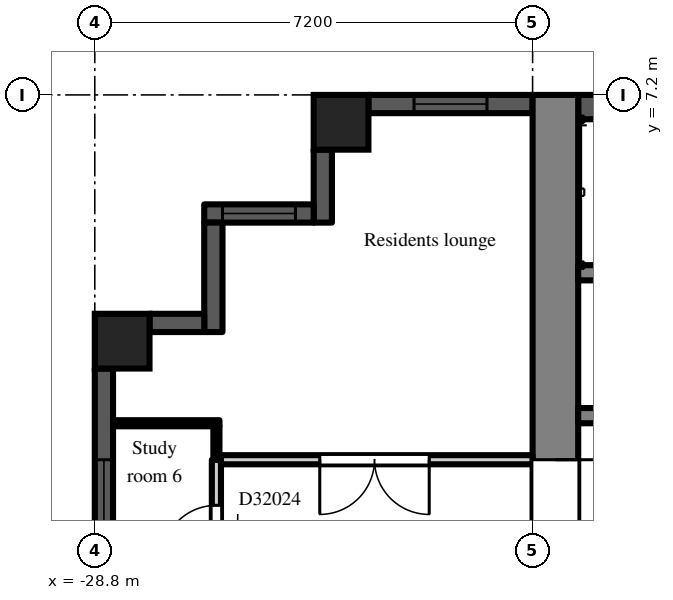
"""IFC4 building model, lengths in metres.
Left out: names, types, materials, properties, quantities, classifications, styles, units other than length and angle.
Written with IfcOpenShell. Run it as: python <this file> out.ifc"""

import sys

from ifc_helpers import new_model, si_unit, direction, frame, frame_2d, origin, origin_2d, place, context, subcontext, project, spatial, rectangle, extrude, element, fill, save


model = new_model("IFC4")
c1 = context("Model", 3, precision=1e-05, world=origin(), true_north=direction((0.0, 1.0)))
c2 = subcontext(c1, "Body", "Model", "MODEL_VIEW")
j1 = project(units=[si_unit("LENGTHUNIT", "METRE"), si_unit("PLANEANGLEUNIT", "RADIAN")], contexts=[c1])
p1 = place(None, origin())
s1 = spatial("IfcSite", under=j1, at=p1, CompositionType="ELEMENT")
p2 = place(p1, origin())
s2 = spatial("IfcBuilding", under=s1, at=p2, CompositionType="ELEMENT")
p3 = place(p2, frame((0.0, 0.0, 225.9)))
s3 = spatial("IfcBuildingStorey", under=s2, at=p3, CompositionType="ELEMENT", Elevation=225.9)
for number, where, z_axis, x_axis in (
    (1, (-28.35, 3.15, 0.0), (0.0, 0.0, 1.0), (1.0, 0.0, 0.0)),
    (2, (-24.75, 6.75, 0.0), (0.0, 0.0, 1.0), (1.0, 0.0, 0.0)),
):
    element("IfcColumn", number, at=place(p3, frame(where, z_axis=z_axis, x_axis=x_axis)), inside=s3, PredefinedType="COLUMN", context=c2, shape_type="SweptSolid", body=[
        extrude(rectangle(XDim=0.9, YDim=0.9, at=origin_2d()), origin(), (0.0, 0.0, 1.0), 3.0),
    ])
p4 = place(p3, frame((-21.6, 7.05, 0.0), z_axis=(0.0, 0.0, 1.0), x_axis=(-1.0, 0.0, 0.0)))
e3 = element("IfcWall", 3, at=p4, inside=s3, PredefinedType="SOLIDWALL", context=c2, shape_type="SweptSolid", body=[
    extrude(rectangle(XDim=2.7, YDim=0.3, at=frame_2d((1.35, 0.0))), origin(), (0.0, 0.0, 1.0), 2.3),
])
p5 = place(p4, frame((0.75, 0.0, 0.2)))
e4 = element("IfcOpeningElement", 4, at=p5, cuts=e3, PredefinedType="OPENING", context=c2, shape_type="SweptSolid", body=[
    extrude(rectangle(XDim=1.2, YDim=1.85, at=frame_2d((0.6, 0.925))), frame((0.0, 0.16, 0.0), z_axis=(0.0, -1.0, 0.0), x_axis=(1.0, 0.0, 0.0)), (0.0, 0.0, 1.0), 0.32),
])
p6 = place(p3, frame((-25.05, 6.3, 0.0), z_axis=(0.0, 0.0, 1.0), x_axis=(0.0, -1.0, 0.0)))
e5 = element("IfcWall", 5, at=p6, inside=s3, PredefinedType="SOLIDWALL", context=c2, shape_type="SweptSolid", body=[
    extrude(rectangle(XDim=1.2, YDim=0.3, at=frame_2d((0.6, 0.0))), origin(), (0.0, 0.0, 1.0), 2.6),
])
p7 = place(p3, frame((-25.2, 5.25, 0.0), z_axis=(0.0, 0.0, 1.0), x_axis=(-1.0, 0.0, 0.0)))
e6 = element("IfcWall", 6, at=p7, inside=s3, PredefinedType="SOLIDWALL", context=c2, shape_type="SweptSolid", body=[
    extrude(rectangle(XDim=1.8, YDim=0.3, at=frame_2d((0.9, 0.0))), origin(), (0.0, 0.0, 1.0), 2.6),
])
p8 = place(p7, frame((0.3, 0.0, 0.2)))
e7 = element("IfcOpeningElement", 7, at=p8, cuts=e6, PredefinedType="OPENING", context=c2, shape_type="SweptSolid", body=[
    extrude(rectangle(XDim=1.2, YDim=1.85, at=frame_2d((0.6, 0.925))), frame((0.0, 0.16, 0.0), z_axis=(0.0, -1.0, 0.0), x_axis=(1.0, 0.0, 0.0)), (0.0, 0.0, 1.0), 0.32),
])
p9 = place(p3, frame((-26.85, 5.1, 0.0), z_axis=(0.0, 0.0, 1.0), x_axis=(0.0, -1.0, 0.0)))
e8 = element("IfcWall", 8, at=p9, inside=s3, PredefinedType="SOLIDWALL", context=c2, shape_type="SweptSolid", body=[
    extrude(rectangle(XDim=1.8, YDim=0.3, at=frame_2d((0.9, 0.0))), origin(), (0.0, 0.0, 1.0), 2.6),
])
p10 = place(p3, frame((-27.0, 3.45, 0.0), z_axis=(0.0, 0.0, 1.0), x_axis=(-1.0, 0.0, 0.0)))
e9 = element("IfcWall", 9, at=p10, inside=s3, PredefinedType="SOLIDWALL", context=c2, shape_type="SweptSolid", body=[
    extrude(rectangle(XDim=0.9, YDim=0.3, at=frame_2d((0.45, 0.0))), origin(), (0.0, 0.0, 1.0), 2.6),
])
p11 = place(p3, frame((-28.65, 2.7, 0.0), z_axis=(0.0, 0.0, 1.0), x_axis=(0.0, -1.0, 0.0)))
e10 = element("IfcWall", 10, at=p11, inside=s3, PredefinedType="SOLIDWALL", context=c2, shape_type="SweptSolid", body=[
    extrude(rectangle(XDim=5.4, YDim=0.3, at=frame_2d((2.7, 0.0))), origin(), (0.0, 0.0, 1.0), 2.3),
])
p12 = place(p11, frame((1.5, 0.0, 0.2)))
e11 = element("IfcOpeningElement", 11, at=p12, cuts=e10, PredefinedType="OPENING", context=c2, shape_type="SweptSolid", body=[
    extrude(rectangle(XDim=2.4, YDim=1.85, at=frame_2d((1.2, 0.925))), frame((0.0, 0.16, 0.0), z_axis=(0.0, -1.0, 0.0), x_axis=(1.0, 0.0, 0.0)), (0.0, 0.0, 1.0), 0.32),
])
p13 = place(p3, frame((-21.225, -7.2, 0.0), z_axis=(0.0, 0.0, 1.0), x_axis=(0.0, 1.0, 0.0)))
e12 = element("IfcWall", 12, at=p13, inside=s3, PredefinedType="SHEAR", context=c2, shape_type="SweptSolid", body=[
    extrude(rectangle(XDim=14.4, YDim=0.75, at=frame_2d((7.2, 0.0))), origin(), (0.0, 0.0, 1.0), 2.6),
])
p14 = place(p13, frame((6.0, 0.0, 0.0)))
e13 = element("IfcOpeningElement", 13, at=p14, cuts=e12, PredefinedType="OPENING", context=c2, shape_type="SweptSolid", body=[
    extrude(rectangle(XDim=2.4, YDim=2.2, at=frame_2d((1.2, 1.1))), frame((0.0, 0.385, 0.0), z_axis=(0.0, -1.0, 0.0), x_axis=(1.0, 0.0, 0.0)), (0.0, 0.0, 1.0), 0.77),
])
p15 = place(p3, frame((-7.9, 7.0, 0.0), z_axis=(0.0, 0.0, 1.0), x_axis=(-1.0, 0.0, 0.0)))
e14 = element("IfcWall", 14, at=p15, inside=s3, PredefinedType="SHEAR", context=c2, shape_type="SweptSolid", body=[
    extrude(rectangle(XDim=12.95, YDim=0.4, at=frame_2d((6.475, 0.0))), origin(), (0.0, 0.0, 1.0), 2.6),
])
p16 = place(p3, frame((-7.9, 1.925, 0.0), z_axis=(0.0, 0.0, 1.0), x_axis=(-1.0, 0.0, 0.0)))
e15 = element("IfcWall", 15, at=p16, inside=s3, PredefinedType="SHEAR", context=c2, shape_type="SweptSolid", body=[
    extrude(rectangle(XDim=12.95, YDim=0.25, at=frame_2d((6.475, 0.0))), origin(), (0.0, 0.0, 1.0), 2.6),
])
p17 = place(p16, frame((4.825, 0.0, 0.0)))
e16 = element("IfcOpeningElement", 16, at=p17, cuts=e15, PredefinedType="OPENING", context=c2, shape_type="SweptSolid", body=[
    extrude(rectangle(XDim=1.1, YDim=2.1, at=frame_2d((0.55, 1.05))), frame((0.0, 0.135, 0.0), z_axis=(0.0, -1.0, 0.0), x_axis=(1.0, 0.0, 0.0)), (0.0, 0.0, 1.0), 0.27),
])
p18 = place(p16, frame((7.025, 0.0, 0.0)))
e17 = element("IfcOpeningElement", 17, at=p18, cuts=e15, PredefinedType="OPENING", context=c2, shape_type="SweptSolid", body=[
    extrude(rectangle(XDim=1.1, YDim=2.1, at=frame_2d((0.55, 1.05))), frame((0.0, 0.135, 0.0), z_axis=(0.0, -1.0, 0.0), x_axis=(1.0, 0.0, 0.0)), (0.0, 0.0, 1.0), 0.27),
])
p19 = place(p16, frame((9.225, 0.0, 0.0)))
e18 = element("IfcOpeningElement", 18, at=p19, cuts=e15, PredefinedType="OPENING", context=c2, shape_type="SweptSolid", body=[
    extrude(rectangle(XDim=1.1, YDim=2.1, at=frame_2d((0.55, 1.05))), frame((0.0, 0.135, 0.0), z_axis=(0.0, -1.0, 0.0), x_axis=(1.0, 0.0, 0.0)), (0.0, 0.0, 1.0), 0.27),
])
p20 = place(p16, frame((0.525, 0.0, 0.0)))
e19 = element("IfcOpeningElement", 19, at=p20, cuts=e15, PredefinedType="OPENING", context=c2, shape_type="SweptSolid", body=[
    extrude(rectangle(XDim=0.9, YDim=2.1, at=frame_2d((0.45, 1.05))), frame((0.0, 0.135, 0.0), z_axis=(0.0, -1.0, 0.0), x_axis=(1.0, 0.0, 0.0)), (0.0, 0.0, 1.0), 0.27),
])
p21 = place(p16, frame((2.625, 0.0, 0.0)))
e20 = element("IfcOpeningElement", 20, at=p21, cuts=e15, PredefinedType="OPENING", context=c2, shape_type="SweptSolid", body=[
    extrude(rectangle(XDim=1.1, YDim=2.1, at=frame_2d((0.55, 1.05))), frame((0.0, 0.135, 0.0), z_axis=(0.0, -1.0, 0.0), x_axis=(1.0, 0.0, 0.0)), (0.0, 0.0, 1.0), 0.27),
])
p22 = place(p16, frame((11.525, 0.0, 0.0)))
e21 = element("IfcOpeningElement", 21, at=p22, cuts=e15, PredefinedType="OPENING", context=c2, shape_type="SweptSolid", body=[
    extrude(rectangle(XDim=0.9, YDim=2.1, at=frame_2d((0.45, 1.05))), frame((0.0, 0.135, 0.0), z_axis=(0.0, -1.0, 0.0), x_axis=(1.0, 0.0, 0.0)), (0.0, 0.0, 1.0), 0.27),
])
p23 = place(p3, frame((-12.3, 4.275, 0.0), z_axis=(0.0, 0.0, 1.0), x_axis=(-1.0, 0.0, 0.0)))
e22 = element("IfcWall", 22, at=p23, inside=s3, PredefinedType="SHEAR", context=c2, shape_type="SweptSolid", body=[
    extrude(rectangle(XDim=8.55, YDim=0.25, at=frame_2d((4.275, 0.0))), origin(), (0.0, 0.0, 1.0), 2.6),
])
p24 = place(p3, frame((-28.5, 1.8, 0.0), z_axis=(0.0, 0.0, 1.0), x_axis=(1.0, 0.0, 0.0)))
e23 = element("IfcWall", 23, at=p24, inside=s3, PredefinedType="PARTITIONING", context=c2, shape_type="SweptSolid", body=[
    extrude(rectangle(XDim=1.75, YDim=0.1, at=frame_2d((0.875, 0.0))), origin(), (0.0, 0.0, 1.0), 2.6),
])
p25 = place(p3, frame((-26.8, -1.2, 0.0), z_axis=(0.0, 0.0, 1.0), x_axis=(0.0, 1.0, 0.0)))
e24 = element("IfcWall", 24, at=p25, inside=s3, PredefinedType="PARTITIONING", context=c2, shape_type="SweptSolid", body=[
    extrude(rectangle(XDim=2.4, YDim=0.15, at=frame_2d((1.2, 0.0))), origin(), (0.0, 0.0, 1.0), 2.6),
])
p26 = place(p25, frame((0.75, 0.0, 0.0)))
e25 = element("IfcOpeningElement", 25, at=p26, cuts=e24, PredefinedType="OPENING", context=c2, shape_type="SweptSolid", body=[
    extrude(rectangle(XDim=0.9, YDim=2.1, at=frame_2d((0.45, 1.05))), frame((0.0, 0.085, 0.0), z_axis=(0.0, -1.0, 0.0), x_axis=(1.0, 0.0, 0.0)), (0.0, 0.0, 1.0), 0.17),
])
p27 = place(p3, frame((-26.8, 1.2, 0.0), z_axis=(0.0, 0.0, 1.0), x_axis=(0.0, 1.0, 0.0)))
e26 = element("IfcWall", 26, at=p27, inside=s3, PredefinedType="PARTITIONING", context=c2, shape_type="SweptSolid", body=[
    extrude(rectangle(XDim=0.55, YDim=0.1, at=frame_2d((0.275, 0.0))), origin(), (0.0, 0.0, 1.0), 2.6),
])
p28 = place(p3, frame((-26.725, 1.2, 0.0), z_axis=(0.0, 0.0, 1.0), x_axis=(1.0, 0.0, 0.0)))
e27 = element("IfcWall", 27, at=p28, inside=s3, PredefinedType="PARTITIONING", context=c2, shape_type="SweptSolid", body=[
    extrude(rectangle(XDim=5.125, YDim=0.15, at=frame_2d((2.562, 0.0))), origin(), (0.0, 0.0, 1.0), 2.6),
])
p29 = place(p28, frame((1.625, 0.0, 0.0)))
e28 = element("IfcOpeningElement", 28, at=p29, cuts=e27, PredefinedType="OPENING", context=c2, shape_type="SweptSolid", body=[
    extrude(rectangle(XDim=1.8, YDim=2.1, at=frame_2d((0.9, 1.05))), frame((0.0, 0.085, 0.0), z_axis=(0.0, -1.0, 0.0), x_axis=(1.0, 0.0, 0.0)), (0.0, 0.0, 1.0), 0.17),
])
p30 = place(p5, origin())
e29 = element("IfcWindow", 29, at=p30, inside=s3, PartitioningType="SINGLE_PANEL", PredefinedType="WINDOW", context=c2, shape_type="SweptSolid", body=[
    extrude(rectangle(XDim=1.2, YDim=1.85, at=frame_2d((0.6, 0.925))), frame((0.0, 0.03, 0.0), z_axis=(0.0, -1.0, 0.0), x_axis=(1.0, 0.0, 0.0)), (0.0, 0.0, 1.0), 0.06),
])
fill(e4, e29)
p31 = place(p8, origin())
e30 = element("IfcWindow", 30, at=p31, inside=s3, PartitioningType="SINGLE_PANEL", PredefinedType="WINDOW", context=c2, shape_type="SweptSolid", body=[
    extrude(rectangle(XDim=1.2, YDim=1.85, at=frame_2d((0.6, 0.925))), frame((0.0, 0.03, 0.0), z_axis=(0.0, -1.0, 0.0), x_axis=(1.0, 0.0, 0.0)), (0.0, 0.0, 1.0), 0.06),
])
fill(e7, e30)
p32 = place(p12, origin())
e31 = element("IfcWindow", 31, at=p32, inside=s3, PartitioningType="SINGLE_PANEL", PredefinedType="WINDOW", context=c2, shape_type="SweptSolid", body=[
    extrude(rectangle(XDim=2.4, YDim=1.85, at=frame_2d((1.2, 0.925))), frame((0.0, 0.03, 0.0), z_axis=(0.0, -1.0, 0.0), x_axis=(1.0, 0.0, 0.0)), (0.0, 0.0, 1.0), 0.06),
])
fill(e11, e31)
p33 = place(p14, frame((2.4, 0.0, 0.0), z_axis=(0.0, 0.0, 1.0), x_axis=(-1.0, 0.0, 0.0)))
e32 = element("IfcDoor", 32, at=p33, inside=s3, OperationType="DOUBLE_DOOR_DOUBLE_SWING", PredefinedType="DOOR", context=c2, shape_type="SweptSolid", body=[
    extrude(rectangle(XDim=2.4, YDim=2.2, at=frame_2d((1.2, 1.1))), frame((0.0, 0.025, 0.0), z_axis=(0.0, -1.0, 0.0), x_axis=(1.0, 0.0, 0.0)), (0.0, 0.0, 1.0), 0.05),
])
fill(e13, e32)
p34 = place(p26, origin())
e33 = element("IfcDoor", 33, at=p34, inside=s3, OperationType="SINGLE_SWING_LEFT", PredefinedType="DOOR", context=c2, shape_type="SweptSolid", body=[
    extrude(rectangle(XDim=0.9, YDim=2.1, at=frame_2d((0.45, 1.05))), frame((0.0, 0.025, 0.0), z_axis=(0.0, -1.0, 0.0), x_axis=(1.0, 0.0, 0.0)), (0.0, 0.0, 1.0), 0.05),
])
fill(e25, e33)
p35 = place(p29, frame((1.8, 0.0, 0.0), z_axis=(0.0, 0.0, 1.0), x_axis=(-1.0, 0.0, 0.0)))
e34 = element("IfcDoor", 34, at=p35, inside=s3, OperationType="DOUBLE_DOOR_DOUBLE_SWING", PredefinedType="DOOR", context=c2, shape_type="SweptSolid", body=[
    extrude(rectangle(XDim=1.8, YDim=2.1, at=frame_2d((0.9, 1.05))), frame((0.0, 0.025, 0.0), z_axis=(0.0, -1.0, 0.0), x_axis=(1.0, 0.0, 0.0)), (0.0, 0.0, 1.0), 0.05),
])
fill(e28, e34)
save(model, sys.argv[1])
